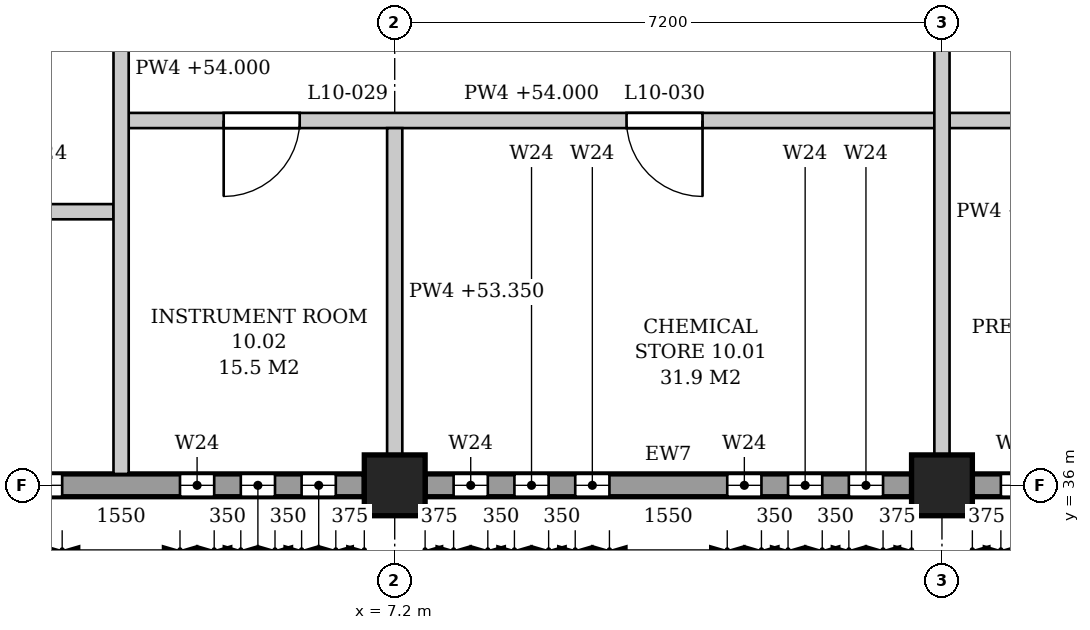
"""IFC4 building model, lengths in metres.
Left out: names, types, materials, properties, quantities, classifications, styles, units other than length and angle.
Written with IfcOpenShell. Run it as: python <this file> out.ifc"""

import sys

from ifc_helpers import new_model, si_unit, direction, frame, frame_2d, origin, origin_2d, place, context, subcontext, project, spatial, polyline, rectangle, outline, extrude, element, fill, save


model = new_model("IFC4")
c1 = context("Model", 3, precision=1e-05, world=origin(), true_north=direction((0.0, 1.0)))
c2 = subcontext(c1, "Body", "Model", "MODEL_VIEW")
j1 = project(units=[si_unit("LENGTHUNIT", "METRE"), si_unit("PLANEANGLEUNIT", "RADIAN")], contexts=[c1])
p1 = place(None, origin())
s1 = spatial("IfcSite", under=j1, at=p1, CompositionType="ELEMENT")
p2 = place(p1, origin())
s2 = spatial("IfcBuilding", under=s1, at=p2, CompositionType="ELEMENT")
p3 = place(p2, frame((0.0, 0.0, 49.8)))
s3 = spatial("IfcBuildingStorey", under=s2, at=p3, CompositionType="ELEMENT", Elevation=49.8)
for number, where, z_axis, x_axis in (
    (1, (7.2, 36.0, 0.0), (0.0, 0.0, 1.0), (1.0, 0.0, 0.0)),
    (2, (14.4, 36.0, 0.0), (0.0, 0.0, 1.0), (1.0, 0.0, 0.0)),
):
    element("IfcColumn", number, at=place(p3, frame(where, z_axis=z_axis, x_axis=x_axis)), inside=s3, PredefinedType="COLUMN", context=c2, shape_type="SweptSolid", body=[
        extrude(rectangle(XDim=0.8, YDim=0.8, at=origin_2d()), origin(), (0.0, 0.0, 1.0), 4.5),
    ])
p4 = place(p3, frame((0.4, 36.0, 0.0), z_axis=(0.0, 0.0, 1.0), x_axis=(1.0, 0.0, 0.0)))
e3 = element("IfcWall", 3, at=p4, inside=s3, PredefinedType="STANDARD", context=c2, shape_type="SweptSolid", body=[
    extrude(rectangle(XDim=6.4, YDim=0.3, at=frame_2d((3.2, 0.0))), origin(), (0.0, 0.0, 1.0), 3.6),
])
p5 = place(p4, frame((0.375, 0.0, 0.9)))
e4 = element("IfcOpeningElement", 4, at=p5, cuts=e3, PredefinedType="OPENING", context=c2, shape_type="SweptSolid", body=[
    extrude(outline(polyline([(0.0, 0.0), (0.45, 0.0), (0.45, 2.35), (0.225, 2.6), (0.0, 2.35), (0.0, 0.0)])), frame((0.0, 0.16, 0.0), z_axis=(0.0, -1.0, 0.0), x_axis=(1.0, 0.0, 0.0)), (0.0, 0.0, 1.0), 0.32),
])
p6 = place(p4, frame((1.175, 0.0, 0.9)))
e5 = element("IfcOpeningElement", 5, at=p6, cuts=e3, PredefinedType="OPENING", context=c2, shape_type="SweptSolid", body=[
    extrude(outline(polyline([(0.0, 0.0), (0.45, 0.0), (0.45, 2.35), (0.225, 2.6), (0.0, 2.35), (0.0, 0.0)])), frame((0.0, 0.16, 0.0), z_axis=(0.0, -1.0, 0.0), x_axis=(1.0, 0.0, 0.0)), (0.0, 0.0, 1.0), 0.32),
])
p7 = place(p4, frame((1.975, 0.0, 0.9)))
e6 = element("IfcOpeningElement", 6, at=p7, cuts=e3, PredefinedType="OPENING", context=c2, shape_type="SweptSolid", body=[
    extrude(outline(polyline([(0.0, 0.0), (0.45, 0.0), (0.45, 2.35), (0.225, 2.6), (0.0, 2.35), (0.0, 0.0)])), frame((0.0, 0.16, 0.0), z_axis=(0.0, -1.0, 0.0), x_axis=(1.0, 0.0, 0.0)), (0.0, 0.0, 1.0), 0.32),
])
p8 = place(p4, frame((3.975, 0.0, 0.9)))
e7 = element("IfcOpeningElement", 7, at=p8, cuts=e3, PredefinedType="OPENING", context=c2, shape_type="SweptSolid", body=[
    extrude(outline(polyline([(0.0, 0.0), (0.45, 0.0), (0.45, 2.35), (0.225, 2.6), (0.0, 2.35), (0.0, 0.0)])), frame((0.0, 0.16, 0.0), z_axis=(0.0, -1.0, 0.0), x_axis=(1.0, 0.0, 0.0)), (0.0, 0.0, 1.0), 0.32),
])
p9 = place(p4, frame((4.775, 0.0, 0.9)))
e8 = element("IfcOpeningElement", 8, at=p9, cuts=e3, PredefinedType="OPENING", context=c2, shape_type="SweptSolid", body=[
    extrude(outline(polyline([(0.0, 0.0), (0.45, 0.0), (0.45, 2.35), (0.225, 2.6), (0.0, 2.35), (0.0, 0.0)])), frame((0.0, 0.16, 0.0), z_axis=(0.0, -1.0, 0.0), x_axis=(1.0, 0.0, 0.0)), (0.0, 0.0, 1.0), 0.32),
])
p10 = place(p4, frame((5.575, 0.0, 0.9)))
e9 = element("IfcOpeningElement", 9, at=p10, cuts=e3, PredefinedType="OPENING", context=c2, shape_type="SweptSolid", body=[
    extrude(outline(polyline([(0.0, 0.0), (0.45, 0.0), (0.45, 2.35), (0.225, 2.6), (0.0, 2.35), (0.0, 0.0)])), frame((0.0, 0.16, 0.0), z_axis=(0.0, -1.0, 0.0), x_axis=(1.0, 0.0, 0.0)), (0.0, 0.0, 1.0), 0.32),
])
p11 = place(p3, frame((7.6, 36.0, 0.0), z_axis=(0.0, 0.0, 1.0), x_axis=(1.0, 0.0, 0.0)))
e10 = element("IfcWall", 10, at=p11, inside=s3, PredefinedType="STANDARD", context=c2, shape_type="SweptSolid", body=[
    extrude(rectangle(XDim=6.4, YDim=0.3, at=frame_2d((3.2, 0.0))), origin(), (0.0, 0.0, 1.0), 3.6),
])
p12 = place(p11, frame((0.375, 0.0, 0.9)))
e11 = element("IfcOpeningElement", 11, at=p12, cuts=e10, PredefinedType="OPENING", context=c2, shape_type="SweptSolid", body=[
    extrude(outline(polyline([(0.0, 0.0), (0.45, 0.0), (0.45, 2.35), (0.225, 2.6), (0.0, 2.35), (0.0, 0.0)])), frame((0.0, 0.16, 0.0), z_axis=(0.0, -1.0, 0.0), x_axis=(1.0, 0.0, 0.0)), (0.0, 0.0, 1.0), 0.32),
])
p13 = place(p11, frame((1.175, 0.0, 0.9)))
e12 = element("IfcOpeningElement", 12, at=p13, cuts=e10, PredefinedType="OPENING", context=c2, shape_type="SweptSolid", body=[
    extrude(outline(polyline([(0.0, 0.0), (0.45, 0.0), (0.45, 2.35), (0.225, 2.6), (0.0, 2.35), (0.0, 0.0)])), frame((0.0, 0.16, 0.0), z_axis=(0.0, -1.0, 0.0), x_axis=(1.0, 0.0, 0.0)), (0.0, 0.0, 1.0), 0.32),
])
p14 = place(p11, frame((1.975, 0.0, 0.9)))
e13 = element("IfcOpeningElement", 13, at=p14, cuts=e10, PredefinedType="OPENING", context=c2, shape_type="SweptSolid", body=[
    extrude(outline(polyline([(0.0, 0.0), (0.45, 0.0), (0.45, 2.35), (0.225, 2.6), (0.0, 2.35), (0.0, 0.0)])), frame((0.0, 0.16, 0.0), z_axis=(0.0, -1.0, 0.0), x_axis=(1.0, 0.0, 0.0)), (0.0, 0.0, 1.0), 0.32),
])
p15 = place(p11, frame((3.975, 0.0, 0.9)))
e14 = element("IfcOpeningElement", 14, at=p15, cuts=e10, PredefinedType="OPENING", context=c2, shape_type="SweptSolid", body=[
    extrude(outline(polyline([(0.0, 0.0), (0.45, 0.0), (0.45, 2.35), (0.225, 2.6), (0.0, 2.35), (0.0, 0.0)])), frame((0.0, 0.16, 0.0), z_axis=(0.0, -1.0, 0.0), x_axis=(1.0, 0.0, 0.0)), (0.0, 0.0, 1.0), 0.32),
])
p16 = place(p11, frame((4.775, 0.0, 0.9)))
e15 = element("IfcOpeningElement", 15, at=p16, cuts=e10, PredefinedType="OPENING", context=c2, shape_type="SweptSolid", body=[
    extrude(outline(polyline([(0.0, 0.0), (0.45, 0.0), (0.45, 2.35), (0.225, 2.6), (0.0, 2.35), (0.0, 0.0)])), frame((0.0, 0.16, 0.0), z_axis=(0.0, -1.0, 0.0), x_axis=(1.0, 0.0, 0.0)), (0.0, 0.0, 1.0), 0.32),
])
p17 = place(p11, frame((5.575, 0.0, 0.9)))
e16 = element("IfcOpeningElement", 16, at=p17, cuts=e10, PredefinedType="OPENING", context=c2, shape_type="SweptSolid", body=[
    extrude(outline(polyline([(0.0, 0.0), (0.45, 0.0), (0.45, 2.35), (0.225, 2.6), (0.0, 2.35), (0.0, 0.0)])), frame((0.0, 0.16, 0.0), z_axis=(0.0, -1.0, 0.0), x_axis=(1.0, 0.0, 0.0)), (0.0, 0.0, 1.0), 0.32),
])
p18 = place(p3, frame((14.8, 36.0, 0.0), z_axis=(0.0, 0.0, 1.0), x_axis=(1.0, 0.0, 0.0)))
e17 = element("IfcWall", 17, at=p18, inside=s3, PredefinedType="STANDARD", context=c2, shape_type="SweptSolid", body=[
    extrude(rectangle(XDim=6.4, YDim=0.3, at=frame_2d((3.2, 0.0))), origin(), (0.0, 0.0, 1.0), 3.6),
])
p19 = place(p18, frame((0.375, 0.0, 0.9)))
e18 = element("IfcOpeningElement", 18, at=p19, cuts=e17, PredefinedType="OPENING", context=c2, shape_type="SweptSolid", body=[
    extrude(outline(polyline([(0.0, 0.0), (0.45, 0.0), (0.45, 2.35), (0.225, 2.6), (0.0, 2.35), (0.0, 0.0)])), frame((0.0, 0.16, 0.0), z_axis=(0.0, -1.0, 0.0), x_axis=(1.0, 0.0, 0.0)), (0.0, 0.0, 1.0), 0.32),
])
p20 = place(p18, frame((1.175, 0.0, 0.9)))
e19 = element("IfcOpeningElement", 19, at=p20, cuts=e17, PredefinedType="OPENING", context=c2, shape_type="SweptSolid", body=[
    extrude(outline(polyline([(0.0, 0.0), (0.45, 0.0), (0.45, 2.35), (0.225, 2.6), (0.0, 2.35), (0.0, 0.0)])), frame((0.0, 0.16, 0.0), z_axis=(0.0, -1.0, 0.0), x_axis=(1.0, 0.0, 0.0)), (0.0, 0.0, 1.0), 0.32),
])
p21 = place(p18, frame((1.975, 0.0, 0.9)))
e20 = element("IfcOpeningElement", 20, at=p21, cuts=e17, PredefinedType="OPENING", context=c2, shape_type="SweptSolid", body=[
    extrude(outline(polyline([(0.0, 0.0), (0.45, 0.0), (0.45, 2.35), (0.225, 2.6), (0.0, 2.35), (0.0, 0.0)])), frame((0.0, 0.16, 0.0), z_axis=(0.0, -1.0, 0.0), x_axis=(1.0, 0.0, 0.0)), (0.0, 0.0, 1.0), 0.32),
])
p22 = place(p18, frame((3.975, 0.0, 0.9)))
e21 = element("IfcOpeningElement", 21, at=p22, cuts=e17, PredefinedType="OPENING", context=c2, shape_type="SweptSolid", body=[
    extrude(outline(polyline([(0.0, 0.0), (0.45, 0.0), (0.45, 2.35), (0.225, 2.6), (0.0, 2.35), (0.0, 0.0)])), frame((0.0, 0.16, 0.0), z_axis=(0.0, -1.0, 0.0), x_axis=(1.0, 0.0, 0.0)), (0.0, 0.0, 1.0), 0.32),
])
p23 = place(p18, frame((4.775, 0.0, 0.9)))
e22 = element("IfcOpeningElement", 22, at=p23, cuts=e17, PredefinedType="OPENING", context=c2, shape_type="SweptSolid", body=[
    extrude(outline(polyline([(0.0, 0.0), (0.45, 0.0), (0.45, 2.35), (0.225, 2.6), (0.0, 2.35), (0.0, 0.0)])), frame((0.0, 0.16, 0.0), z_axis=(0.0, -1.0, 0.0), x_axis=(1.0, 0.0, 0.0)), (0.0, 0.0, 1.0), 0.32),
])
p24 = place(p18, frame((5.575, 0.0, 0.9)))
e23 = element("IfcOpeningElement", 23, at=p24, cuts=e17, PredefinedType="OPENING", context=c2, shape_type="SweptSolid", body=[
    extrude(outline(polyline([(0.0, 0.0), (0.45, 0.0), (0.45, 2.35), (0.225, 2.6), (0.0, 2.35), (0.0, 0.0)])), frame((0.0, 0.16, 0.0), z_axis=(0.0, -1.0, 0.0), x_axis=(1.0, 0.0, 0.0)), (0.0, 0.0, 1.0), 0.32),
])
p25 = place(p3, frame((0.15, 39.6, 0.0), z_axis=(0.0, 0.0, 1.0), x_axis=(1.0, 0.0, 0.0)))
e24 = element("IfcWall", 24, at=p25, inside=s3, PredefinedType="PARTITIONING", context=c2, shape_type="SweptSolid", body=[
    extrude(outline(polyline([(0.0, 0.0), (3.35, 0.0), (3.35, 4.2), (0.05, 4.2), (0.05, 3.6), (0.0, 3.6), (0.0, 0.0)])), frame((0.0, 0.1, 0.0), z_axis=(0.0, -1.0, 0.0), x_axis=(1.0, 0.0, 0.0)), (0.0, 0.0, 1.0), 0.2),
])
p26 = place(p25, frame((1.175, 0.0, 0.0)))
e25 = element("IfcOpeningElement", 25, at=p26, cuts=e24, PredefinedType="OPENING", context=c2, shape_type="SweptSolid", body=[
    extrude(rectangle(XDim=1.0, YDim=2.1, at=frame_2d((0.5, 1.05))), frame((0.0, 0.11, 0.0), z_axis=(0.0, -1.0, 0.0), x_axis=(1.0, 0.0, 0.0)), (0.0, 0.0, 1.0), 0.22),
])
p27 = place(p3, frame((3.7, 40.8, 0.0), z_axis=(0.0, 0.0, 1.0), x_axis=(1.0, 0.0, 0.0)))
e26 = element("IfcWall", 26, at=p27, inside=s3, PredefinedType="PARTITIONING", context=c2, shape_type="SweptSolid", body=[
    extrude(outline(polyline([(0.0, 0.0), (10.6, 0.0), (10.6, 3.55), (10.475, 3.55), (10.475, 4.2), (3.725, 4.2), (3.725, 3.55), (3.275, 3.55), (3.275, 4.2), (0.0, 4.2), (0.0, 0.0)])), frame((0.0, 0.1, 0.0), z_axis=(0.0, -1.0, 0.0), x_axis=(1.0, 0.0, 0.0)), (0.0, 0.0, 1.0), 0.2),
])
p28 = place(p27, frame((1.25, 0.0, 0.0)))
e27 = element("IfcOpeningElement", 27, at=p28, cuts=e26, PredefinedType="OPENING", context=c2, shape_type="SweptSolid", body=[
    extrude(rectangle(XDim=1.0, YDim=2.1, at=frame_2d((0.5, 1.05))), frame((0.0, 0.11, 0.0), z_axis=(0.0, -1.0, 0.0), x_axis=(1.0, 0.0, 0.0)), (0.0, 0.0, 1.0), 0.22),
])
p29 = place(p27, frame((6.55, 0.0, 0.0)))
e28 = element("IfcOpeningElement", 28, at=p29, cuts=e26, PredefinedType="OPENING", context=c2, shape_type="SweptSolid", body=[
    extrude(rectangle(XDim=1.0, YDim=2.1, at=frame_2d((0.5, 1.05))), frame((0.0, 0.11, 0.0), z_axis=(0.0, -1.0, 0.0), x_axis=(1.0, 0.0, 0.0)), (0.0, 0.0, 1.0), 0.22),
])
p30 = place(p3, frame((14.5, 40.8, 0.0), z_axis=(0.0, 0.0, 1.0), x_axis=(1.0, 0.0, 0.0)))
e29 = element("IfcWall", 29, at=p30, inside=s3, PredefinedType="PARTITIONING", context=c2, shape_type="SweptSolid", body=[
    extrude(outline(polyline([(0.0, 0.0), (3.4, 0.0), (3.4, 4.2), (0.125, 4.2), (0.125, 3.55), (0.0, 3.55), (0.0, 0.0)])), frame((0.0, 0.1, 0.0), z_axis=(0.0, -1.0, 0.0), x_axis=(1.0, 0.0, 0.0)), (0.0, 0.0, 1.0), 0.2),
])
p31 = place(p30, frame((1.2, 0.0, 0.0)))
e30 = element("IfcOpeningElement", 30, at=p31, cuts=e29, PredefinedType="OPENING", context=c2, shape_type="SweptSolid", body=[
    extrude(rectangle(XDim=1.0, YDim=2.1, at=frame_2d((0.5, 1.05))), frame((0.0, 0.11, 0.0), z_axis=(0.0, -1.0, 0.0), x_axis=(1.0, 0.0, 0.0)), (0.0, 0.0, 1.0), 0.22),
])
p32 = place(p3, frame((3.6, 36.15, 0.0), z_axis=(0.0, 0.0, 1.0), x_axis=(0.0, 1.0, 0.0)))
e31 = element("IfcWall", 31, at=p32, inside=s3, PredefinedType="PARTITIONING", context=c2, shape_type="SweptSolid", body=[
    extrude(outline(polyline([(0.0, 0.0), (10.65, 0.0), (10.65, 4.2), (7.275, 4.2), (7.275, 3.55), (6.825, 3.55), (6.825, 4.2), (0.05, 4.2), (0.05, 3.6), (0.0, 3.6), (0.0, 0.0)])), frame((0.0, 0.1, 0.0), z_axis=(0.0, -1.0, 0.0), x_axis=(1.0, 0.0, 0.0)), (0.0, 0.0, 1.0), 0.2),
])
p33 = place(p3, frame((7.2, 36.4, 0.0), z_axis=(0.0, 0.0, 1.0), x_axis=(0.0, 1.0, 0.0)))
e32 = element("IfcWall", 32, at=p33, inside=s3, PredefinedType="PARTITIONING", context=c2, shape_type="SweptSolid", body=[
    extrude(rectangle(XDim=4.3, YDim=0.2, at=frame_2d((2.15, 0.0))), origin(), (0.0, 0.0, 1.0), 3.55),
])
p34 = place(p3, frame((14.4, 36.4, 0.0), z_axis=(0.0, 0.0, 1.0), x_axis=(0.0, 1.0, 0.0)))
e33 = element("IfcWall", 33, at=p34, inside=s3, PredefinedType="PARTITIONING", context=c2, shape_type="SweptSolid", body=[
    extrude(rectangle(XDim=6.4, YDim=0.2, at=frame_2d((3.2, 0.0))), origin(), (0.0, 0.0, 1.0), 3.55),
])
p35 = place(p7, origin())
e34 = element("IfcWindow", 34, at=p35, inside=s3, PartitioningType="SINGLE_PANEL", PredefinedType="WINDOW", context=c2, shape_type="SweptSolid", body=[
    extrude(outline(polyline([(0.0, 0.0), (0.45, 0.0), (0.45, 2.35), (0.225, 2.6), (0.0, 2.35), (0.0, 0.0)])), frame((0.0, 0.03, 0.0), z_axis=(0.0, -1.0, 0.0), x_axis=(1.0, 0.0, 0.0)), (0.0, 0.0, 1.0), 0.06),
])
fill(e6, e34)
p36 = place(p8, origin())
e35 = element("IfcWindow", 35, at=p36, inside=s3, PartitioningType="SINGLE_PANEL", PredefinedType="WINDOW", context=c2, shape_type="SweptSolid", body=[
    extrude(outline(polyline([(0.0, 0.0), (0.45, 0.0), (0.45, 2.35), (0.225, 2.6), (0.0, 2.35), (0.0, 0.0)])), frame((0.0, 0.03, 0.0), z_axis=(0.0, -1.0, 0.0), x_axis=(1.0, 0.0, 0.0)), (0.0, 0.0, 1.0), 0.06),
])
fill(e7, e35)
p37 = place(p9, origin())
e36 = element("IfcWindow", 36, at=p37, inside=s3, PartitioningType="SINGLE_PANEL", PredefinedType="WINDOW", context=c2, shape_type="SweptSolid", body=[
    extrude(outline(polyline([(0.0, 0.0), (0.45, 0.0), (0.45, 2.35), (0.225, 2.6), (0.0, 2.35), (0.0, 0.0)])), frame((0.0, 0.03, 0.0), z_axis=(0.0, -1.0, 0.0), x_axis=(1.0, 0.0, 0.0)), (0.0, 0.0, 1.0), 0.06),
])
fill(e8, e36)
p38 = place(p10, origin())
e37 = element("IfcWindow", 37, at=p38, inside=s3, PartitioningType="SINGLE_PANEL", PredefinedType="WINDOW", context=c2, shape_type="SweptSolid", body=[
    extrude(outline(polyline([(0.0, 0.0), (0.45, 0.0), (0.45, 2.35), (0.225, 2.6), (0.0, 2.35), (0.0, 0.0)])), frame((0.0, 0.03, 0.0), z_axis=(0.0, -1.0, 0.0), x_axis=(1.0, 0.0, 0.0)), (0.0, 0.0, 1.0), 0.06),
])
fill(e9, e37)
p39 = place(p12, origin())
e38 = element("IfcWindow", 38, at=p39, inside=s3, PartitioningType="SINGLE_PANEL", PredefinedType="WINDOW", context=c2, shape_type="SweptSolid", body=[
    extrude(outline(polyline([(0.0, 0.0), (0.45, 0.0), (0.45, 2.35), (0.225, 2.6), (0.0, 2.35), (0.0, 0.0)])), frame((0.0, 0.03, 0.0), z_axis=(0.0, -1.0, 0.0), x_axis=(1.0, 0.0, 0.0)), (0.0, 0.0, 1.0), 0.06),
])
fill(e11, e38)
p40 = place(p13, origin())
e39 = element("IfcWindow", 39, at=p40, inside=s3, PartitioningType="SINGLE_PANEL", PredefinedType="WINDOW", context=c2, shape_type="SweptSolid", body=[
    extrude(outline(polyline([(0.0, 0.0), (0.45, 0.0), (0.45, 2.35), (0.225, 2.6), (0.0, 2.35), (0.0, 0.0)])), frame((0.0, 0.03, 0.0), z_axis=(0.0, -1.0, 0.0), x_axis=(1.0, 0.0, 0.0)), (0.0, 0.0, 1.0), 0.06),
])
fill(e12, e39)
p41 = place(p14, origin())
e40 = element("IfcWindow", 40, at=p41, inside=s3, PartitioningType="SINGLE_PANEL", PredefinedType="WINDOW", context=c2, shape_type="SweptSolid", body=[
    extrude(outline(polyline([(0.0, 0.0), (0.45, 0.0), (0.45, 2.35), (0.225, 2.6), (0.0, 2.35), (0.0, 0.0)])), frame((0.0, 0.03, 0.0), z_axis=(0.0, -1.0, 0.0), x_axis=(1.0, 0.0, 0.0)), (0.0, 0.0, 1.0), 0.06),
])
fill(e13, e40)
p42 = place(p15, origin())
e41 = element("IfcWindow", 41, at=p42, inside=s3, PartitioningType="SINGLE_PANEL", PredefinedType="WINDOW", context=c2, shape_type="SweptSolid", body=[
    extrude(outline(polyline([(0.0, 0.0), (0.45, 0.0), (0.45, 2.35), (0.225, 2.6), (0.0, 2.35), (0.0, 0.0)])), frame((0.0, 0.03, 0.0), z_axis=(0.0, -1.0, 0.0), x_axis=(1.0, 0.0, 0.0)), (0.0, 0.0, 1.0), 0.06),
])
fill(e14, e41)
p43 = place(p16, origin())
e42 = element("IfcWindow", 42, at=p43, inside=s3, PartitioningType="SINGLE_PANEL", PredefinedType="WINDOW", context=c2, shape_type="SweptSolid", body=[
    extrude(outline(polyline([(0.0, 0.0), (0.45, 0.0), (0.45, 2.35), (0.225, 2.6), (0.0, 2.35), (0.0, 0.0)])), frame((0.0, 0.03, 0.0), z_axis=(0.0, -1.0, 0.0), x_axis=(1.0, 0.0, 0.0)), (0.0, 0.0, 1.0), 0.06),
])
fill(e15, e42)
p44 = place(p17, origin())
e43 = element("IfcWindow", 43, at=p44, inside=s3, PartitioningType="SINGLE_PANEL", PredefinedType="WINDOW", context=c2, shape_type="SweptSolid", body=[
    extrude(outline(polyline([(0.0, 0.0), (0.45, 0.0), (0.45, 2.35), (0.225, 2.6), (0.0, 2.35), (0.0, 0.0)])), frame((0.0, 0.03, 0.0), z_axis=(0.0, -1.0, 0.0), x_axis=(1.0, 0.0, 0.0)), (0.0, 0.0, 1.0), 0.06),
])
fill(e16, e43)
p45 = place(p19, origin())
e44 = element("IfcWindow", 44, at=p45, inside=s3, PartitioningType="SINGLE_PANEL", PredefinedType="WINDOW", context=c2, shape_type="SweptSolid", body=[
    extrude(outline(polyline([(0.0, 0.0), (0.45, 0.0), (0.45, 2.35), (0.225, 2.6), (0.0, 2.35), (0.0, 0.0)])), frame((0.0, 0.03, 0.0), z_axis=(0.0, -1.0, 0.0), x_axis=(1.0, 0.0, 0.0)), (0.0, 0.0, 1.0), 0.06),
])
fill(e18, e44)
p46 = place(p28, frame((1.0, 0.0, 0.0), z_axis=(0.0, 0.0, 1.0), x_axis=(-1.0, 0.0, 0.0)))
e45 = element("IfcDoor", 45, at=p46, inside=s3, OperationType="SINGLE_SWING_RIGHT", PredefinedType="DOOR", context=c2, shape_type="SweptSolid", body=[
    extrude(rectangle(XDim=1.0, YDim=2.1, at=frame_2d((0.5, 1.05))), frame((0.0, 0.025, 0.0), z_axis=(0.0, -1.0, 0.0), x_axis=(1.0, 0.0, 0.0)), (0.0, 0.0, 1.0), 0.05),
])
fill(e27, e45)
p47 = place(p29, frame((1.0, 0.0, 0.0), z_axis=(0.0, 0.0, 1.0), x_axis=(-1.0, 0.0, 0.0)))
e46 = element("IfcDoor", 46, at=p47, inside=s3, OperationType="SINGLE_SWING_LEFT", PredefinedType="DOOR", context=c2, shape_type="SweptSolid", body=[
    extrude(rectangle(XDim=1.0, YDim=2.1, at=frame_2d((0.5, 1.05))), frame((0.0, 0.025, 0.0), z_axis=(0.0, -1.0, 0.0), x_axis=(1.0, 0.0, 0.0)), (0.0, 0.0, 1.0), 0.05),
])
fill(e28, e46)
save(model, sys.argv[1])
